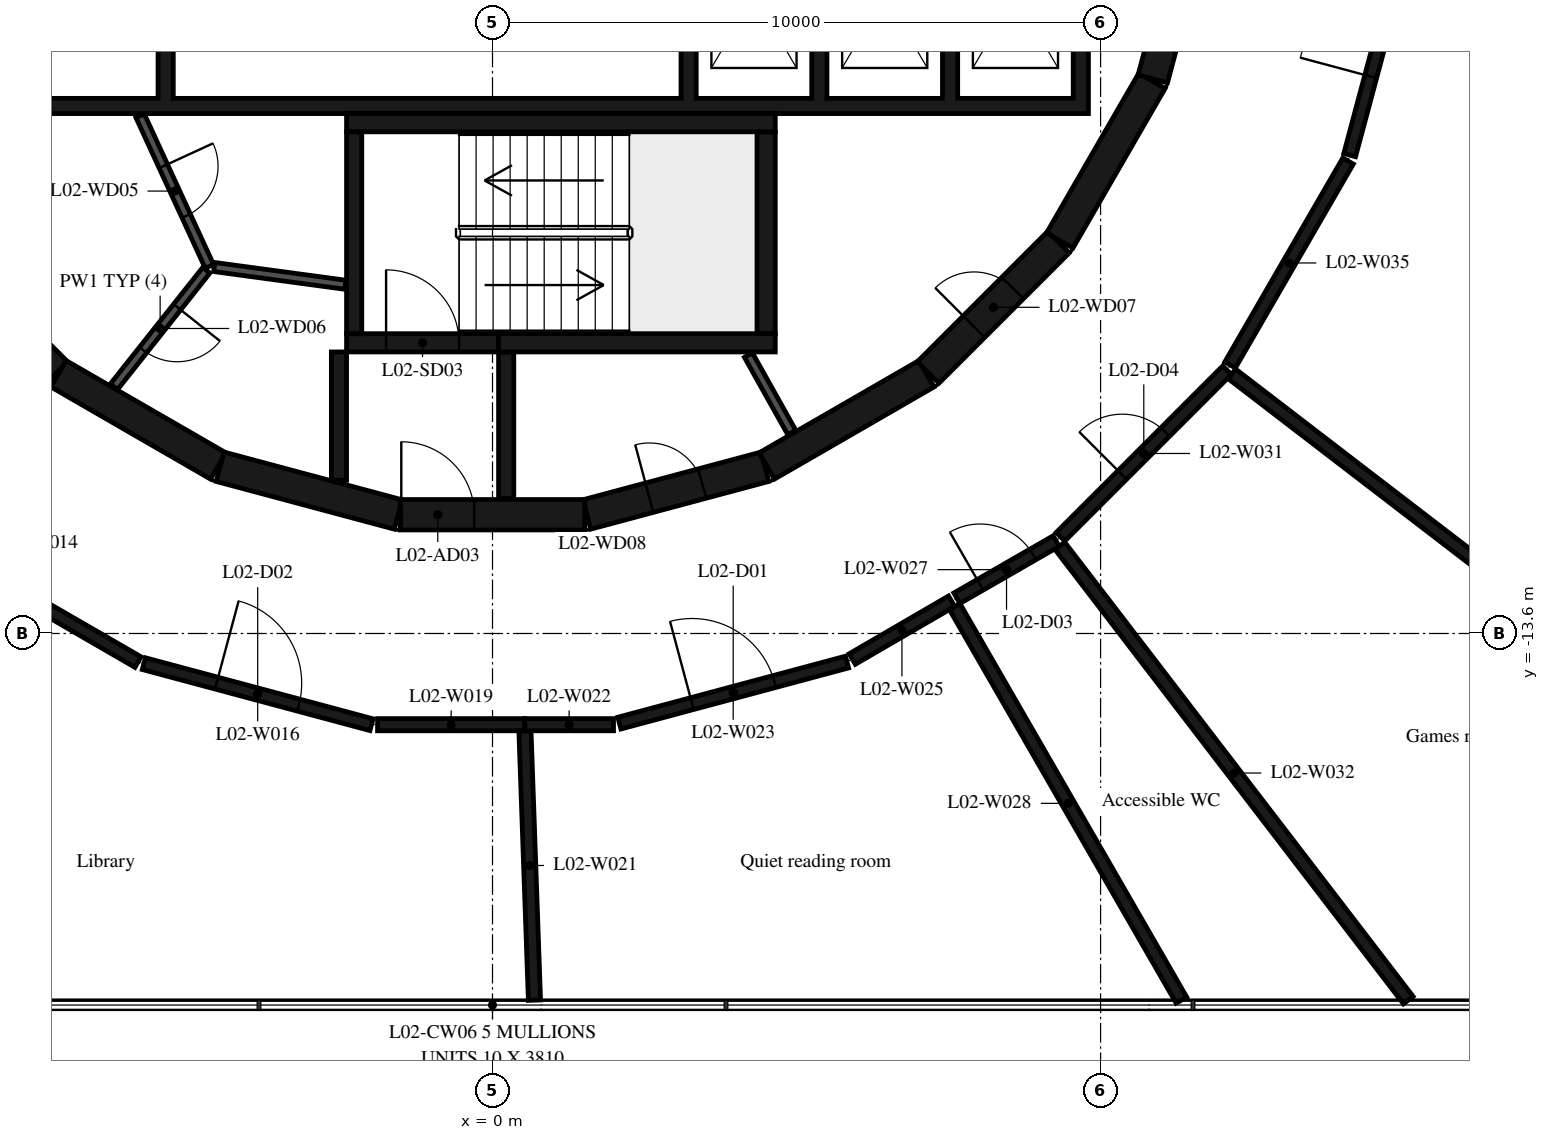
"""IFC4 building model, lengths in metres.
Left out: names, types, materials, properties, quantities, classifications, styles, units other than length and angle.
Written with IfcOpenShell. Run it as: python <this file> out.ifc"""

import sys

from ifc_helpers import new_model, si_unit, direction, frame, frame_2d, origin, place, context, subcontext, project, spatial, polyline, rectangle, outline, extrude, element, fill, save


model = new_model("IFC4")
c1 = context("Model", 3, precision=1e-05, world=origin(), true_north=direction((0.0, 1.0)))
c2 = subcontext(c1, "Body", "Model", "MODEL_VIEW")
j1 = project(units=[si_unit("LENGTHUNIT", "METRE"), si_unit("PLANEANGLEUNIT", "RADIAN")], contexts=[c1])
p1 = place(None, origin())
s1 = spatial("IfcSite", under=j1, at=p1, CompositionType="ELEMENT")
p2 = place(p1, origin())
s2 = spatial("IfcBuilding", under=s1, at=p2, CompositionType="ELEMENT")
p3 = place(p2, frame((0.0, 0.0, 13.8)))
s3 = spatial("IfcBuildingStorey", under=s2, at=p3, CompositionType="ELEMENT", Elevation=13.8)
p4 = place(p3, frame((1.55, -11.643, 0.0), z_axis=(0.0, 0.0, 1.0), x_axis=(0.965948410781, 0.258734743916, 0.0)))
e1 = element("IfcWall", 1, at=p4, inside=s3, PredefinedType="SHEAR", context=c2, shape_type="SweptSolid", body=[
    extrude(rectangle(XDim=3.033, YDim=0.5, at=frame_2d((1.516, 0.0))), origin(), (0.0, 0.0, 1.0), 4.42),
])
p5 = place(p4, frame((1.066, 0.0, 0.0)))
e2 = element("IfcOpeningElement", 2, at=p5, cuts=e1, PredefinedType="OPENING", context=c2, shape_type="SweptSolid", body=[
    extrude(rectangle(XDim=0.9, YDim=2.1, at=frame_2d((0.45, 1.05))), frame((0.0, 0.26, 0.0), z_axis=(0.0, -1.0, 0.0), x_axis=(1.0, 0.0, 0.0)), (0.0, 0.0, 1.0), 0.52),
])
p6 = place(p3, frame((4.51, -10.845, 0.0), z_axis=(0.0, 0.0, 1.0), x_axis=(0.865975092491, 0.500087131594, 0.0)))
e3 = element("IfcWall", 3, at=p6, inside=s3, PredefinedType="SHEAR", context=c2, shape_type="SweptSolid", body=[
    extrude(rectangle(XDim=3.033, YDim=0.5, at=frame_2d((1.516, 0.0))), origin(), (0.0, 0.0, 1.0), 4.42),
])
p7 = place(p3, frame((7.164, -9.308, 0.0), z_axis=(0.0, 0.0, 1.0), x_axis=(0.707106781187, 0.707106781187, 0.0)))
e4 = element("IfcWall", 4, at=p7, inside=s3, PredefinedType="SHEAR", context=c2, shape_type="SweptSolid", body=[
    extrude(rectangle(XDim=3.032, YDim=0.5, at=frame_2d((1.516, 0.0))), origin(), (0.0, 0.0, 1.0), 4.42),
])
p8 = place(p7, frame((1.066, 0.0, 0.0)))
e5 = element("IfcOpeningElement", 5, at=p8, cuts=e4, PredefinedType="OPENING", context=c2, shape_type="SweptSolid", body=[
    extrude(rectangle(XDim=0.9, YDim=2.1, at=frame_2d((0.45, 1.05))), frame((0.0, 0.26, 0.0), z_axis=(0.0, -1.0, 0.0), x_axis=(1.0, 0.0, 0.0)), (0.0, 0.0, 1.0), 0.52),
])
for number, where, z_axis, x_axis in (
    (6, (9.329, -7.137, 0.0), (0.0, 0.0, 1.0), (0.5, 0.866, 0.0)),
    (7, (10.858, -4.479, 0.0), (0.0, 0.0, 1.0), (0.259, 0.966, 0.0)),
):
    element("IfcWall", number, at=place(p3, frame(where, z_axis=z_axis, x_axis=x_axis)), inside=s3, PredefinedType="SHEAR", context=c2, shape_type="SweptSolid", body=[
        extrude(rectangle(XDim=3.033, YDim=0.5, at=frame_2d((1.516, 0.0))), origin(), (0.0, 0.0, 1.0), 4.42),
    ])
p9 = place(p3, frame((-9.308, -7.164, 0.0), z_axis=(0.0, 0.0, 1.0), x_axis=(0.707106781187, -0.707106781187, 0.0)))
e8 = element("IfcWall", 8, at=p9, inside=s3, PredefinedType="SHEAR", context=c2, shape_type="SweptSolid", body=[
    extrude(rectangle(XDim=3.032, YDim=0.5, at=frame_2d((1.516, 0.0))), origin(), (0.0, 0.0, 1.0), 4.42),
])
for number, where, z_axis, x_axis in (
    (9, (-7.137, -9.329, 0.0), (0.0, 0.0, 1.0), (0.866, -0.5, 0.0)),
    (10, (-4.479, -10.858, 0.0), (0.0, 0.0, 1.0), (0.966, -0.259, 0.0)),
):
    element("IfcWall", number, at=place(p3, frame(where, z_axis=z_axis, x_axis=x_axis)), inside=s3, PredefinedType="SHEAR", context=c2, shape_type="SweptSolid", body=[
        extrude(rectangle(XDim=3.033, YDim=0.5, at=frame_2d((1.516, 0.0))), origin(), (0.0, 0.0, 1.0), 4.42),
    ])
p10 = place(p3, frame((-1.516, -11.647, 0.0), z_axis=(0.0, 0.0, 1.0), x_axis=(1.0, 0.0, 0.0)))
e11 = element("IfcWall", 11, at=p10, inside=s3, PredefinedType="SHEAR", context=c2, shape_type="SweptSolid", body=[
    extrude(rectangle(XDim=3.033, YDim=0.5, at=frame_2d((1.516, 0.0))), origin(), (0.0, 0.0, 1.0), 4.42),
])
p11 = place(p10, frame((0.016, 0.0, 0.0)))
e12 = element("IfcOpeningElement", 12, at=p11, cuts=e11, PredefinedType="OPENING", context=c2, shape_type="SweptSolid", body=[
    extrude(rectangle(XDim=1.2, YDim=2.1, at=frame_2d((0.6, 1.05))), frame((0.0, 0.26, 0.0), z_axis=(0.0, -1.0, 0.0), x_axis=(1.0, 0.0, 0.0)), (0.0, 0.0, 1.0), 0.52),
])
p12 = place(p3, frame((-2.275, -8.67, 0.0), z_axis=(0.0, 0.0, 1.0), x_axis=(0.0, 1.0, 0.0)))
e13 = element("IfcWall", 13, at=p12, inside=s3, PredefinedType="SHEAR", context=c2, shape_type="SweptSolid", body=[
    extrude(rectangle(XDim=3.32, YDim=0.25, at=frame_2d((1.66, 0.0))), origin(), (0.0, 0.0, 1.0), 4.42),
])
p13 = place(p3, frame((-2.4, -5.2, 0.0), z_axis=(0.0, 0.0, 1.0), x_axis=(1.0, 0.0, 0.0)))
e14 = element("IfcWall", 14, at=p13, inside=s3, PredefinedType="SHEAR", context=c2, shape_type="SweptSolid", body=[
    extrude(rectangle(XDim=7.05, YDim=0.3, at=frame_2d((3.525, 0.0))), origin(), (0.0, 0.0, 1.0), 4.42),
])
p14 = place(p3, frame((4.5, -8.67, 0.0), z_axis=(0.0, 0.0, 1.0), x_axis=(0.0, 1.0, 0.0)))
e15 = element("IfcWall", 15, at=p14, inside=s3, PredefinedType="SHEAR", context=c2, shape_type="SweptSolid", body=[
    extrude(rectangle(XDim=3.32, YDim=0.3, at=frame_2d((1.66, 0.0))), origin(), (0.0, 0.0, 1.0), 4.42),
])
p15 = place(p3, frame((0.1, -8.82, 0.0), z_axis=(0.0, 0.0, 1.0), x_axis=(1.0, 0.0, 0.0)))
e16 = element("IfcWall", 16, at=p15, inside=s3, PredefinedType="SHEAR", context=c2, shape_type="SweptSolid", body=[
    extrude(rectangle(XDim=4.55, YDim=0.3, at=frame_2d((2.275, 0.0))), origin(), (0.0, 0.0, 1.0), 4.42),
])
p16 = place(p3, frame((-2.4, -8.82, 0.0), z_axis=(0.0, 0.0, 1.0), x_axis=(1.0, 0.0, 0.0)))
e17 = element("IfcWall", 17, at=p16, inside=s3, PredefinedType="SHEAR", context=c2, shape_type="SweptSolid", body=[
    extrude(rectangle(XDim=2.5, YDim=0.3, at=frame_2d((1.25, 0.0))), origin(), (0.0, 0.0, 1.0), 4.42),
])
p17 = place(p16, frame((0.65, 0.0, 0.0)))
e18 = element("IfcOpeningElement", 18, at=p17, cuts=e17, PredefinedType="OPENING", context=c2, shape_type="SweptSolid", body=[
    extrude(rectangle(XDim=1.2, YDim=2.1, at=frame_2d((0.6, 1.05))), frame((0.0, 0.16, 0.0), z_axis=(0.0, -1.0, 0.0), x_axis=(1.0, 0.0, 0.0)), (0.0, 0.0, 1.0), 0.32),
])
p18 = place(p3, frame((-2.525, -8.97, 0.0), z_axis=(0.0, 0.0, 1.0), x_axis=(0.0, -1.0, 0.0)))
e19 = element("IfcWall", 19, at=p18, inside=s3, PredefinedType="SHEAR", context=c2, shape_type="SweptSolid", body=[
    extrude(rectangle(XDim=2.11, YDim=0.25, at=frame_2d((1.055, 0.0))), origin(), (0.0, 0.0, 1.0), 4.42),
])
p19 = place(p3, frame((0.225, -8.97, 0.0), z_axis=(0.0, 0.0, 1.0), x_axis=(0.0, -1.0, 0.0)))
e20 = element("IfcWall", 20, at=p19, inside=s3, PredefinedType="SHEAR", context=c2, shape_type="SweptSolid", body=[
    extrude(rectangle(XDim=2.41, YDim=0.25, at=frame_2d((1.205, 0.0))), origin(), (0.0, 0.0, 1.0), 4.42),
])
p20 = place(p3, origin())
e21 = element("IfcWall", 21, at=p20, inside=s3, PredefinedType="SHEAR", context=c2, shape_type="SweptSolid", body=[
    extrude(outline(polyline([(9.8, -5.05), (9.8, -4.8), (9.8, -1.9), (9.55, -1.9), (9.55, -4.8), (7.65, -4.8), (7.65, -1.9), (7.4, -1.9), (7.4, -4.8), (5.5, -4.8), (5.5, -1.9), (5.25, -1.9), (5.25, -4.8), (3.35, -4.8), (3.35, -1.9), (3.1, -1.9), (3.1, -4.8), (-5.25, -4.8), (-5.25, -1.9), (-5.5, -1.9), (-5.5, -4.8), (-7.4, -4.8), (-7.4, -1.9), (-7.65, -1.9), (-7.65, -4.8), (-9.55, -4.8), (-9.55, -1.9), (-9.8, -1.9), (-9.8, -4.8), (-9.8, -5.05), (9.8, -5.05)])), origin(), (0.0, 0.0, 1.0), 4.42),
])
p21 = place(p3, frame((4.922, -10.296, 0.0), z_axis=(0.0, 0.0, 1.0), x_axis=(-0.48860846254, 0.872503163509, 0.0)))
e22 = element("IfcWall", 22, at=p21, inside=s3, PredefinedType="PARTITIONING", context=c2, shape_type="SweptSolid", body=[
    extrude(rectangle(XDim=1.459, YDim=0.15, at=frame_2d((0.73, 0.0))), origin(), (0.0, 0.0, 1.0), 4.42),
])
p22 = place(p3, frame((-5.795, -5.086, 0.0), z_axis=(0.0, 0.0, 1.0), x_axis=(0.417887867606, -0.908498613157, 0.0)))
e23 = element("IfcWall", 23, at=p22, inside=s3, PredefinedType="PARTITIONING", context=c2, shape_type="SweptSolid", body=[
    extrude(rectangle(XDim=2.726, YDim=0.15, at=frame_2d((1.363, 0.0))), origin(), (0.0, 0.0, 1.0), 4.42),
])
p23 = place(p22, frame((0.913, 0.0, 0.0)))
e24 = element("IfcOpeningElement", 24, at=p23, cuts=e23, PredefinedType="OPENING", context=c2, shape_type="SweptSolid", body=[
    extrude(rectangle(XDim=0.9, YDim=2.1, at=frame_2d((0.45, 1.05))), frame((0.0, 0.085, 0.0), z_axis=(0.0, -1.0, 0.0), x_axis=(1.0, 0.0, 0.0)), (0.0, 0.0, 1.0), 0.17),
])
p24 = place(p3, frame((-4.706, -7.625, 0.0), z_axis=(0.0, 0.0, 1.0), x_axis=(-0.621392599334, -0.783499353856, 0.0)))
e25 = element("IfcWall", 25, at=p24, inside=s3, PredefinedType="PARTITIONING", context=c2, shape_type="SweptSolid", body=[
    extrude(rectangle(XDim=2.447, YDim=0.15, at=frame_2d((1.224, 0.0))), origin(), (0.0, 0.0, 1.0), 4.42),
])
p25 = place(p24, frame((0.774, 0.0, 0.0)))
e26 = element("IfcOpeningElement", 26, at=p25, cuts=e25, PredefinedType="OPENING", context=c2, shape_type="SweptSolid", body=[
    extrude(rectangle(XDim=0.9, YDim=2.1, at=frame_2d((0.45, 1.05))), frame((0.0, 0.085, 0.0), z_axis=(0.0, -1.0, 0.0), x_axis=(1.0, 0.0, 0.0)), (0.0, 0.0, 1.0), 0.17),
])
p26 = place(p3, frame((-2.42, -7.865, 0.0), z_axis=(0.0, 0.0, 1.0), x_axis=(-0.990972299108, 0.134066783362, 0.0)))
e27 = element("IfcWall", 27, at=p26, inside=s3, PredefinedType="PARTITIONING", context=c2, shape_type="SweptSolid", body=[
    extrude(rectangle(XDim=2.176, YDim=0.15, at=frame_2d((1.088, 0.0))), origin(), (0.0, 0.0, 1.0), 4.42),
])
p27 = place(p3, frame((-9.183, -12.13, 0.0), z_axis=(0.0, 0.0, 1.0), x_axis=(0.865585884642, -0.500760497952, 0.0)))
e28 = element("IfcWall", 28, at=p27, inside=s3, PredefinedType="PARTITIONING", context=c2, shape_type="SweptSolid", body=[
    extrude(rectangle(XDim=3.874, YDim=0.2, at=frame_2d((1.937, 0.0))), origin(), (0.0, 0.0, 1.0), 4.42),
])
p28 = place(p3, frame((-5.733, -14.096, 0.0), z_axis=(0.0, 0.0, 1.0), x_axis=(0.96585437197, -0.259085569159, 0.0)))
e29 = element("IfcWall", 29, at=p28, inside=s3, PredefinedType="PARTITIONING", context=c2, shape_type="SweptSolid", body=[
    extrude(rectangle(XDim=3.876, YDim=0.2, at=frame_2d((1.938, 0.0))), origin(), (0.0, 0.0, 1.0), 4.42),
])
p29 = place(p28, frame((1.238, 0.0, 0.0)))
e30 = element("IfcOpeningElement", 30, at=p29, cuts=e29, PredefinedType="OPENING", context=c2, shape_type="SweptSolid", body=[
    extrude(rectangle(XDim=1.4, YDim=2.1, at=frame_2d((0.7, 1.05))), frame((0.0, 0.11, 0.0), z_axis=(0.0, -1.0, 0.0), x_axis=(1.0, 0.0, 0.0)), (0.0, 0.0, 1.0), 0.22),
])
p30 = place(p3, frame((-1.89, -15.1, 0.0), z_axis=(0.0, 0.0, 1.0), x_axis=(1.0, 0.0, 0.0)))
e31 = element("IfcWall", 31, at=p30, inside=s3, PredefinedType="PARTITIONING", context=c2, shape_type="SweptSolid", body=[
    extrude(rectangle(XDim=2.42, YDim=0.2, at=frame_2d((1.21, 0.0))), origin(), (0.0, 0.0, 1.0), 4.42),
])
p31 = place(p3, frame((0.533, -15.2, 0.0), z_axis=(0.0, 0.0, 1.0), x_axis=(0.035304513721, -0.999376601343, 0.0)))
e32 = element("IfcWall", 32, at=p31, inside=s3, PredefinedType="PARTITIONING", context=c2, shape_type="SweptSolid", body=[
    extrude(rectangle(XDim=4.433, YDim=0.2, at=frame_2d((2.216, 0.0))), origin(), (0.0, 0.0, 1.0), 4.42),
])
p32 = place(p3, frame((0.53, -15.1, 0.0), z_axis=(0.0, 0.0, 1.0), x_axis=(1.0, 0.0, 0.0)))
e33 = element("IfcWall", 33, at=p32, inside=s3, PredefinedType="PARTITIONING", context=c2, shape_type="SweptSolid", body=[
    extrude(rectangle(XDim=1.46, YDim=0.2, at=frame_2d((0.73, 0.0))), origin(), (0.0, 0.0, 1.0), 4.42),
])
p33 = place(p3, frame((2.087, -15.074, 0.0), z_axis=(0.0, 0.0, 1.0), x_axis=(0.965870133458, 0.259026804199, 0.0)))
e34 = element("IfcWall", 34, at=p33, inside=s3, PredefinedType="PARTITIONING", context=c2, shape_type="SweptSolid", body=[
    extrude(rectangle(XDim=3.876, YDim=0.2, at=frame_2d((1.938, 0.0))), origin(), (0.0, 0.0, 1.0), 4.42),
])
p34 = place(p33, frame((1.238, 0.0, 0.0)))
e35 = element("IfcOpeningElement", 35, at=p34, cuts=e34, PredefinedType="OPENING", context=c2, shape_type="SweptSolid", body=[
    extrude(rectangle(XDim=1.4, YDim=2.1, at=frame_2d((0.7, 1.05))), frame((0.0, 0.11, 0.0), z_axis=(0.0, -1.0, 0.0), x_axis=(1.0, 0.0, 0.0)), (0.0, 0.0, 1.0), 0.22),
])
p35 = place(p3, frame((5.917, -14.02, 0.0), z_axis=(0.0, 0.0, 1.0), x_axis=(0.864513714777, 0.502609228887, 0.0)))
e36 = element("IfcWall", 36, at=p35, inside=s3, PredefinedType="PARTITIONING", context=c2, shape_type="SweptSolid", body=[
    extrude(rectangle(XDim=1.89, YDim=0.2, at=frame_2d((0.945, 0.0))), origin(), (0.0, 0.0, 1.0), 4.42),
])
p36 = place(p3, frame((7.637, -13.02, 0.0), z_axis=(0.0, 0.0, 1.0), x_axis=(0.86672429601, 0.49878752461, 0.0)))
e37 = element("IfcWall", 37, at=p36, inside=s3, PredefinedType="PARTITIONING", context=c2, shape_type="SweptSolid", body=[
    extrude(rectangle(XDim=1.885, YDim=0.2, at=frame_2d((0.942, 0.0))), origin(), (0.0, 0.0, 1.0), 4.42),
])
p37 = place(p36, frame((0.442, 0.0, 0.0)))
e38 = element("IfcOpeningElement", 38, at=p37, cuts=e37, PredefinedType="OPENING", context=c2, shape_type="SweptSolid", body=[
    extrude(rectangle(XDim=1.0, YDim=2.1, at=frame_2d((0.5, 1.05))), frame((0.0, 0.11, 0.0), z_axis=(0.0, -1.0, 0.0), x_axis=(1.0, 0.0, 0.0)), (0.0, 0.0, 1.0), 0.22),
])
p38 = place(p3, frame((7.6, -13.157, 0.0), z_axis=(0.0, 0.0, 1.0), x_axis=(0.499292387003, -0.866433559069, 0.0)))
e39 = element("IfcWall", 39, at=p38, inside=s3, PredefinedType="PARTITIONING", context=c2, shape_type="SweptSolid", body=[
    extrude(rectangle(XDim=7.471, YDim=0.2, at=frame_2d((3.735, 0.0))), origin(), (0.0, 0.0, 1.0), 4.42),
])
p39 = place(p3, frame((9.341, -12.009, 0.0), z_axis=(0.0, 0.0, 1.0), x_axis=(0.707106781187, 0.707106781187, 0.0)))
e40 = element("IfcWall", 40, at=p39, inside=s3, PredefinedType="PARTITIONING", context=c2, shape_type="SweptSolid", body=[
    extrude(rectangle(XDim=3.874, YDim=0.2, at=frame_2d((1.937, 0.0))), origin(), (0.0, 0.0, 1.0), 4.42),
])
p40 = place(p39, frame((1.437, 0.0, 0.0)))
e41 = element("IfcOpeningElement", 41, at=p40, cuts=e40, PredefinedType="OPENING", context=c2, shape_type="SweptSolid", body=[
    extrude(rectangle(XDim=1.0, YDim=2.1, at=frame_2d((0.5, 1.05))), frame((0.0, 0.11, 0.0), z_axis=(0.0, -1.0, 0.0), x_axis=(1.0, 0.0, 0.0)), (0.0, 0.0, 1.0), 0.22),
])
p41 = place(p3, frame((9.331, -12.159, 0.0), z_axis=(0.0, 0.0, 1.0), x_axis=(0.608558385637, -0.793509099677, 0.0)))
e42 = element("IfcWall", 42, at=p41, inside=s3, PredefinedType="PARTITIONING", context=c2, shape_type="SweptSolid", body=[
    extrude(rectangle(XDim=9.415, YDim=0.2, at=frame_2d((4.707, 0.0))), origin(), (0.0, 0.0, 1.0), 4.42),
])
p42 = place(p3, frame((12.13, -9.183, 0.0), z_axis=(0.0, 0.0, 1.0), x_axis=(0.500760497952, 0.865585884642, 0.0)))
e43 = element("IfcWall", 43, at=p42, inside=s3, PredefinedType="PARTITIONING", context=c2, shape_type="SweptSolid", body=[
    extrude(rectangle(XDim=3.874, YDim=0.2, at=frame_2d((1.937, 0.0))), origin(), (0.0, 0.0, 1.0), 4.42),
])
p43 = place(p3, frame((12.159, -9.331, 0.0), z_axis=(0.0, 0.0, 1.0), x_axis=(0.793226820575, -0.608926277246, 0.0)))
e44 = element("IfcWall", 44, at=p43, inside=s3, PredefinedType="PARTITIONING", context=c2, shape_type="SweptSolid", body=[
    extrude(rectangle(XDim=15.091, YDim=0.2, at=frame_2d((7.545, 0.0))), origin(), (0.0, 0.0, 1.0), 4.42),
])
p44 = place(p3, frame((14.096, -5.733, 0.0), z_axis=(0.0, 0.0, 1.0), x_axis=(0.259085569159, 0.96585437197, 0.0)))
e45 = element("IfcWall", 45, at=p44, inside=s3, PredefinedType="PARTITIONING", context=c2, shape_type="SweptSolid", body=[
    extrude(rectangle(XDim=3.876, YDim=0.2, at=frame_2d((1.938, 0.0))), origin(), (0.0, 0.0, 1.0), 4.42),
])
p45 = place(p44, frame((1.338, 0.0, 0.0)))
e46 = element("IfcOpeningElement", 46, at=p45, cuts=e45, PredefinedType="OPENING", context=c2, shape_type="SweptSolid", body=[
    extrude(rectangle(XDim=1.2, YDim=2.1, at=frame_2d((0.6, 1.05))), frame((0.0, 0.11, 0.0), z_axis=(0.0, -1.0, 0.0), x_axis=(1.0, 0.0, 0.0)), (0.0, 0.0, 1.0), 0.22),
])
p46 = place(p17, origin())
e47 = element("IfcDoor", 47, at=p46, inside=s3, OperationType="SINGLE_SWING_LEFT", PredefinedType="DOOR", context=c2, shape_type="SweptSolid", body=[
    extrude(rectangle(XDim=1.2, YDim=2.1, at=frame_2d((0.6, 1.05))), frame((0.0, 0.025, 0.0), z_axis=(0.0, -1.0, 0.0), x_axis=(1.0, 0.0, 0.0)), (0.0, 0.0, 1.0), 0.05),
])
fill(e18, e47)
p47 = place(p11, origin())
e48 = element("IfcDoor", 48, at=p47, inside=s3, OperationType="SINGLE_SWING_RIGHT", PredefinedType="DOOR", context=c2, shape_type="SweptSolid", body=[
    extrude(rectangle(XDim=1.2, YDim=2.1, at=frame_2d((0.6, 1.05))), frame((0.0, 0.025, 0.0), z_axis=(0.0, -1.0, 0.0), x_axis=(1.0, 0.0, 0.0)), (0.0, 0.0, 1.0), 0.05),
])
fill(e12, e48)
p48 = place(p23, origin())
e49 = element("IfcDoor", 49, at=p48, inside=s3, OperationType="SINGLE_SWING_RIGHT", PredefinedType="DOOR", context=c2, shape_type="SweptSolid", body=[
    extrude(rectangle(XDim=0.9, YDim=2.1, at=frame_2d((0.45, 1.05))), frame((0.0, 0.025, 0.0), z_axis=(0.0, -1.0, 0.0), x_axis=(1.0, 0.0, 0.0)), (0.0, 0.0, 1.0), 0.05),
])
fill(e24, e49)
p49 = place(p25, origin())
e50 = element("IfcDoor", 50, at=p49, inside=s3, OperationType="SINGLE_SWING_LEFT", PredefinedType="DOOR", context=c2, shape_type="SweptSolid", body=[
    extrude(rectangle(XDim=0.9, YDim=2.1, at=frame_2d((0.45, 1.05))), frame((0.0, 0.025, 0.0), z_axis=(0.0, -1.0, 0.0), x_axis=(1.0, 0.0, 0.0)), (0.0, 0.0, 1.0), 0.05),
])
fill(e26, e50)
p50 = place(p8, origin())
e51 = element("IfcDoor", 51, at=p50, inside=s3, OperationType="SINGLE_SWING_RIGHT", PredefinedType="DOOR", context=c2, shape_type="SweptSolid", body=[
    extrude(rectangle(XDim=0.9, YDim=2.1, at=frame_2d((0.45, 1.05))), frame((0.0, 0.025, 0.0), z_axis=(0.0, -1.0, 0.0), x_axis=(1.0, 0.0, 0.0)), (0.0, 0.0, 1.0), 0.05),
])
fill(e5, e51)
p51 = place(p5, origin())
e52 = element("IfcDoor", 52, at=p51, inside=s3, OperationType="SINGLE_SWING_LEFT", PredefinedType="DOOR", context=c2, shape_type="SweptSolid", body=[
    extrude(rectangle(XDim=0.9, YDim=2.1, at=frame_2d((0.45, 1.05))), frame((0.0, 0.025, 0.0), z_axis=(0.0, -1.0, 0.0), x_axis=(1.0, 0.0, 0.0)), (0.0, 0.0, 1.0), 0.05),
])
fill(e2, e52)
p52 = place(p34, origin())
e53 = element("IfcDoor", 53, at=p52, inside=s3, OperationType="DOUBLE_DOOR_SINGLE_SWING", PredefinedType="DOOR", context=c2, shape_type="SweptSolid", body=[
    extrude(rectangle(XDim=1.4, YDim=2.1, at=frame_2d((0.7, 1.05))), frame((0.0, 0.025, 0.0), z_axis=(0.0, -1.0, 0.0), x_axis=(1.0, 0.0, 0.0)), (0.0, 0.0, 1.0), 0.05),
])
fill(e35, e53)
p53 = place(p29, origin())
e54 = element("IfcDoor", 54, at=p53, inside=s3, OperationType="DOUBLE_DOOR_SINGLE_SWING", PredefinedType="DOOR", context=c2, shape_type="SweptSolid", body=[
    extrude(rectangle(XDim=1.4, YDim=2.1, at=frame_2d((0.7, 1.05))), frame((0.0, 0.025, 0.0), z_axis=(0.0, -1.0, 0.0), x_axis=(1.0, 0.0, 0.0)), (0.0, 0.0, 1.0), 0.05),
])
fill(e30, e54)
p54 = place(p37, origin())
e55 = element("IfcDoor", 55, at=p54, inside=s3, OperationType="SINGLE_SWING_LEFT", PredefinedType="DOOR", context=c2, shape_type="SweptSolid", body=[
    extrude(rectangle(XDim=1.0, YDim=2.1, at=frame_2d((0.5, 1.05))), frame((0.0, 0.025, 0.0), z_axis=(0.0, -1.0, 0.0), x_axis=(1.0, 0.0, 0.0)), (0.0, 0.0, 1.0), 0.05),
])
fill(e38, e55)
p55 = place(p40, origin())
e56 = element("IfcDoor", 56, at=p55, inside=s3, OperationType="SINGLE_SWING_LEFT", PredefinedType="DOOR", context=c2, shape_type="SweptSolid", body=[
    extrude(rectangle(XDim=1.0, YDim=2.1, at=frame_2d((0.5, 1.05))), frame((0.0, 0.025, 0.0), z_axis=(0.0, -1.0, 0.0), x_axis=(1.0, 0.0, 0.0)), (0.0, 0.0, 1.0), 0.05),
])
fill(e41, e56)
p56 = place(p45, origin())
e57 = element("IfcDoor", 57, at=p56, inside=s3, OperationType="SINGLE_SWING_LEFT", PredefinedType="DOOR", context=c2, shape_type="SweptSolid", body=[
    extrude(rectangle(XDim=1.2, YDim=2.1, at=frame_2d((0.6, 1.05))), frame((0.0, 0.025, 0.0), z_axis=(0.0, -1.0, 0.0), x_axis=(1.0, 0.0, 0.0)), (0.0, 0.0, 1.0), 0.05),
])
fill(e46, e57)
save(model, sys.argv[1])
